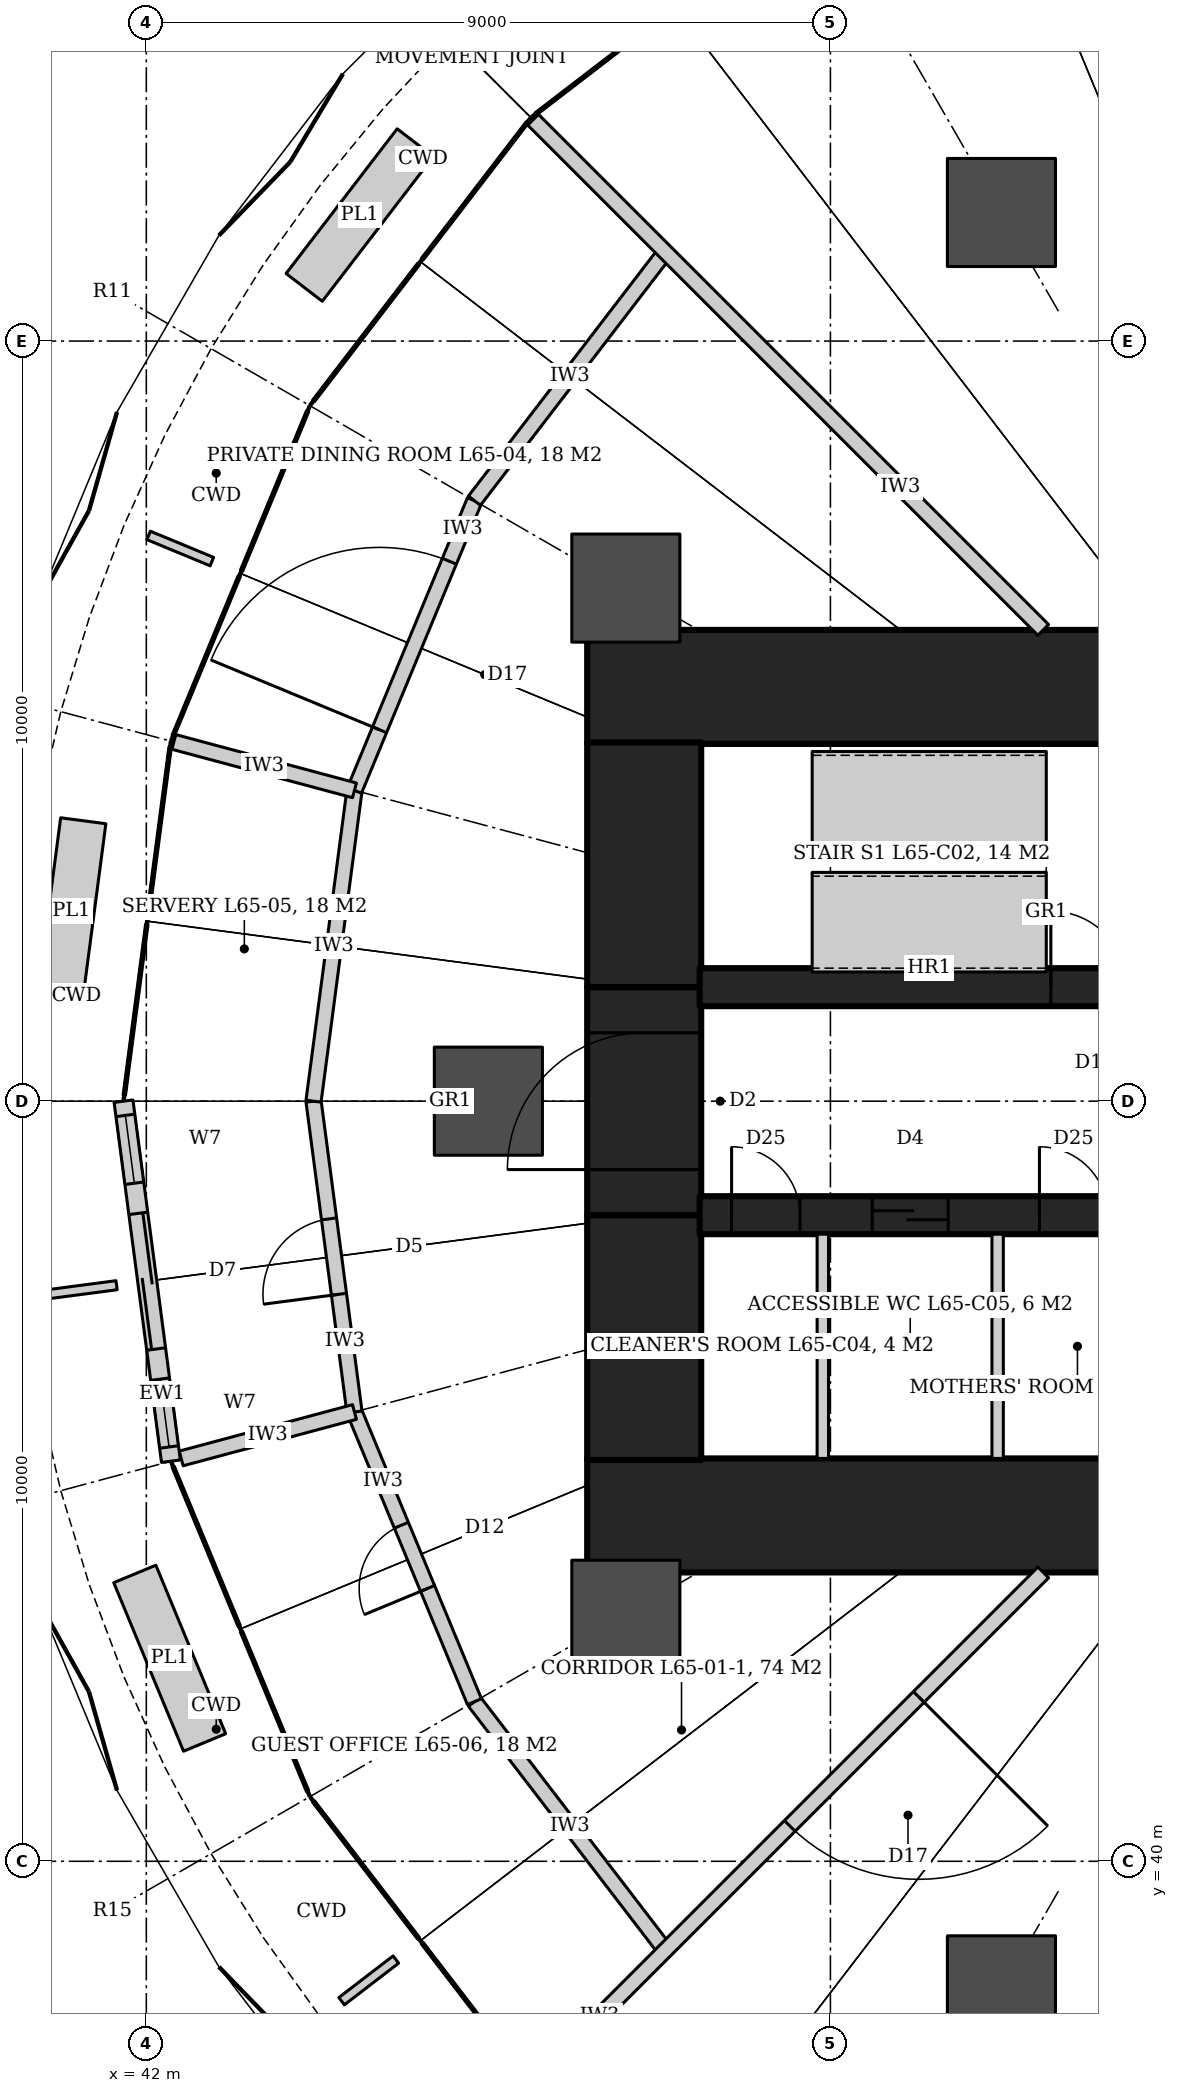
"""IFC4 building model, lengths in metres.
Left out: names, types, materials, properties, quantities, classifications, styles, units other than length and angle.
Written with IfcOpenShell. Run it as: python <this file> out.ifc"""

import sys

from ifc_helpers import new_model, si_unit, direction, frame, frame_2d, origin, origin_2d, place, context, subcontext, project, spatial, rectangle, hollow_circle, extrude, element, fill, save


model = new_model("IFC4")
c1 = context("Model", 3, precision=1e-05, world=origin(), true_north=direction((0.0, 1.0)))
c2 = subcontext(c1, "Body", "Model", "MODEL_VIEW")
j1 = project(units=[si_unit("LENGTHUNIT", "METRE"), si_unit("PLANEANGLEUNIT", "RADIAN")], contexts=[c1])
p1 = place(None, origin())
s1 = spatial("IfcSite", under=j1, at=p1, CompositionType="ELEMENT")
p2 = place(p1, origin())
s2 = spatial("IfcBuilding", under=s1, at=p2, CompositionType="ELEMENT")
p3 = place(p2, frame((0.0, 0.0, 278.0)))
s3 = spatial("IfcBuildingStorey", under=s2, at=p3, CompositionType="ELEMENT", Elevation=278.0)
for number, where, z_axis, x_axis in (
    (1, (47.8, 55.45, 0.0), (0.0, 0.0, 1.0), (1.0, 0.0, 0.0)),
    (2, (47.8, 44.55, 0.0), (0.0, 0.0, 1.0), (1.0, 0.0, 0.0)),
):
    element("IfcWall", number, at=place(p3, frame(where, z_axis=z_axis, x_axis=x_axis)), inside=s3, PredefinedType="SHEAR", context=c2, shape_type="SweptSolid", body=[
        extrude(rectangle(XDim=7.6, YDim=1.5, at=frame_2d((3.8, 0.0))), origin(), (0.0, 0.0, 1.0), 4.2),
    ])
p4 = place(p3, frame((48.55, 45.28, 0.0), z_axis=(0.0, 0.0, 1.0), x_axis=(0.0, 1.0, 0.0)))
e3 = element("IfcWall", 3, at=p4, inside=s3, PredefinedType="SHEAR", context=c2, shape_type="SweptSolid", body=[
    extrude(rectangle(XDim=3.22, YDim=1.5, at=frame_2d((1.61, 0.0))), origin(), (0.0, 0.0, 1.0), 4.2),
])
p5 = place(p3, frame((48.55, 48.5, 0.0), z_axis=(0.0, 0.0, 1.0), x_axis=(0.0, 1.0, 0.0)))
e4 = element("IfcWall", 4, at=p5, inside=s3, PredefinedType="SHEAR", context=c2, shape_type="SweptSolid", body=[
    extrude(rectangle(XDim=3.0, YDim=1.5, at=frame_2d((1.5, 0.0))), origin(), (0.0, 0.0, 1.0), 4.2),
])
p6 = place(p5, frame((0.6, 0.0, 0.0)))
e5 = element("IfcOpeningElement", 5, at=p6, cuts=e4, PredefinedType="OPENING", context=c2, shape_type="SweptSolid", body=[
    extrude(rectangle(XDim=1.8, YDim=2.1, at=frame_2d((0.9, 1.05))), frame((0.0, 0.76, 0.0), z_axis=(0.0, -1.0, 0.0), x_axis=(1.0, 0.0, 0.0)), (0.0, 0.0, 1.0), 1.52),
])
p7 = place(p3, frame((48.55, 51.5, 0.0), z_axis=(0.0, 0.0, 1.0), x_axis=(0.0, 1.0, 0.0)))
e6 = element("IfcWall", 6, at=p7, inside=s3, PredefinedType="SHEAR", context=c2, shape_type="SweptSolid", body=[
    extrude(rectangle(XDim=3.22, YDim=1.5, at=frame_2d((1.61, 0.0))), origin(), (0.0, 0.0, 1.0), 4.2),
])
p8 = place(p3, frame((49.28, 51.5, 0.0), z_axis=(0.0, 0.0, 1.0), x_axis=(1.0, 0.0, 0.0)))
e7 = element("IfcWall", 7, at=p8, inside=s3, PredefinedType="SHEAR", context=c2, shape_type="SweptSolid", body=[
    extrude(rectangle(XDim=6.12, YDim=0.5, at=frame_2d((3.06, 0.0))), origin(), (0.0, 0.0, 1.0), 4.2),
])
p9 = place(p8, frame((4.62, 0.0, 0.0)))
e8 = element("IfcOpeningElement", 8, at=p9, cuts=e7, PredefinedType="OPENING", context=c2, shape_type="SweptSolid", body=[
    extrude(rectangle(XDim=1.0, YDim=2.1, at=frame_2d((0.5, 1.05))), frame((0.0, 0.26, 0.0), z_axis=(0.0, -1.0, 0.0), x_axis=(1.0, 0.0, 0.0)), (0.0, 0.0, 1.0), 0.52),
])
p10 = place(p3, frame((49.28, 48.5, 0.0), z_axis=(0.0, 0.0, 1.0), x_axis=(1.0, 0.0, 0.0)))
e9 = element("IfcWall", 9, at=p10, inside=s3, PredefinedType="SHEAR", context=c2, shape_type="SweptSolid", body=[
    extrude(rectangle(XDim=6.12, YDim=0.5, at=frame_2d((3.06, 0.0))), origin(), (0.0, 0.0, 1.0), 4.2),
])
p11 = place(p10, frame((0.42, 0.0, 0.0)))
e10 = element("IfcOpeningElement", 10, at=p11, cuts=e9, PredefinedType="OPENING", context=c2, shape_type="SweptSolid", body=[
    extrude(rectangle(XDim=0.9, YDim=2.1, at=frame_2d((0.45, 1.05))), frame((0.0, 0.26, 0.0), z_axis=(0.0, -1.0, 0.0), x_axis=(1.0, 0.0, 0.0)), (0.0, 0.0, 1.0), 0.52),
])
p12 = place(p10, frame((2.27, 0.0, 0.0)))
e11 = element("IfcOpeningElement", 11, at=p12, cuts=e9, PredefinedType="OPENING", context=c2, shape_type="SweptSolid", body=[
    extrude(rectangle(XDim=1.0, YDim=2.1, at=frame_2d((0.5, 1.05))), frame((0.0, 0.26, 0.0), z_axis=(0.0, -1.0, 0.0), x_axis=(1.0, 0.0, 0.0)), (0.0, 0.0, 1.0), 0.52),
])
p13 = place(p10, frame((4.47, 0.0, 0.0)))
e12 = element("IfcOpeningElement", 12, at=p13, cuts=e9, PredefinedType="OPENING", context=c2, shape_type="SweptSolid", body=[
    extrude(rectangle(XDim=0.9, YDim=2.1, at=frame_2d((0.45, 1.05))), frame((0.0, 0.26, 0.0), z_axis=(0.0, -1.0, 0.0), x_axis=(1.0, 0.0, 0.0)), (0.0, 0.0, 1.0), 0.52),
])
for number, where, z_axis, x_axis in (
    (13, (53.25, 61.691, 0.0), (0.0, 0.0, 1.0), (1.0, 0.0, 0.0)),
    (14, (48.309, 56.75, 0.0), (0.0, 0.0, 1.0), (1.0, 0.0, 0.0)),
    (15, (46.5, 50.0, 0.0), (0.0, 0.0, 1.0), (1.0, 0.0, 0.0)),
    (16, (48.309, 43.25, 0.0), (0.0, 0.0, 1.0), (1.0, 0.0, 0.0)),
    (17, (53.25, 38.309, 0.0), (0.0, 0.0, 1.0), (1.0, 0.0, 0.0)),
):
    element("IfcColumn", number, at=place(p3, frame(where, z_axis=z_axis, x_axis=x_axis)), inside=s3, PredefinedType="COLUMN", context=c2, shape_type="SweptSolid", body=[
        extrude(hollow_circle(Radius=0.711, WallThickness=0.07, at=origin_2d()), origin(), (0.0, 0.0, 1.0), 4.2),
    ])
p14 = place(p3, frame((48.828, 38.828, 0.0), z_axis=(0.0, 0.0, 1.0), x_axis=(-0.608714823874, 0.793389099494, 0.0)))
e18 = element("IfcWall", 18, at=p14, inside=s3, PredefinedType="PARTITIONING", context=c2, shape_type="SweptSolid", body=[
    extrude(rectangle(XDim=4.125, YDim=0.2, at=frame_2d((2.062, 0.0))), origin(), (0.0, 0.0, 1.0), 3.02),
])
p15 = place(p3, frame((46.317, 42.1, 0.0), z_axis=(0.0, 0.0, 1.0), x_axis=(-0.382731667114, 0.923859551549, 0.0)))
e19 = element("IfcWall", 19, at=p15, inside=s3, PredefinedType="PARTITIONING", context=c2, shape_type="SweptSolid", body=[
    extrude(rectangle(XDim=4.125, YDim=0.2, at=frame_2d((2.062, 0.0))), origin(), (0.0, 0.0, 1.0), 3.02),
])
p16 = place(p15, frame((1.612, 0.0, 0.0)))
e20 = element("IfcOpeningElement", 20, at=p16, cuts=e19, PredefinedType="OPENING", context=c2, shape_type="SweptSolid", body=[
    extrude(rectangle(XDim=0.9, YDim=2.4, at=frame_2d((0.45, 1.2))), frame((0.0, 0.11, 0.0), z_axis=(0.0, -1.0, 0.0), x_axis=(1.0, 0.0, 0.0)), (0.0, 0.0, 1.0), 0.22),
])
p17 = place(p3, frame((44.738, 45.911, 0.0), z_axis=(0.0, 0.0, 1.0), x_axis=(-0.130515758099, 0.991446234996, 0.0)))
e21 = element("IfcWall", 21, at=p17, inside=s3, PredefinedType="PARTITIONING", context=c2, shape_type="SweptSolid", body=[
    extrude(rectangle(XDim=4.125, YDim=0.2, at=frame_2d((2.062, 0.0))), origin(), (0.0, 0.0, 1.0), 3.02),
])
p18 = place(p17, frame((1.562, 0.0, 0.0)))
e22 = element("IfcOpeningElement", 22, at=p18, cuts=e21, PredefinedType="OPENING", context=c2, shape_type="SweptSolid", body=[
    extrude(rectangle(XDim=1.0, YDim=2.1, at=frame_2d((0.5, 1.05))), frame((0.0, 0.11, 0.0), z_axis=(0.0, -1.0, 0.0), x_axis=(1.0, 0.0, 0.0)), (0.0, 0.0, 1.0), 0.22),
])
p19 = place(p3, frame((44.2, 50.0, 0.0), z_axis=(0.0, 0.0, 1.0), x_axis=(0.130515758099, 0.991446234996, 0.0)))
e23 = element("IfcWall", 23, at=p19, inside=s3, PredefinedType="PARTITIONING", context=c2, shape_type="SweptSolid", body=[
    extrude(rectangle(XDim=4.125, YDim=0.2, at=frame_2d((2.062, 0.0))), origin(), (0.0, 0.0, 1.0), 3.02),
])
p20 = place(p3, frame((44.738, 54.089, 0.0), z_axis=(0.0, 0.0, 1.0), x_axis=(0.382731667114, 0.923859551549, 0.0)))
e24 = element("IfcWall", 24, at=p20, inside=s3, PredefinedType="PARTITIONING", context=c2, shape_type="SweptSolid", body=[
    extrude(rectangle(XDim=4.125, YDim=0.2, at=frame_2d((2.062, 0.0))), origin(), (0.0, 0.0, 1.0), 3.02),
])
p21 = place(p20, frame((0.862, 0.0, 0.0)))
e25 = element("IfcOpeningElement", 25, at=p21, cuts=e24, PredefinedType="OPENING", context=c2, shape_type="SweptSolid", body=[
    extrude(rectangle(XDim=2.4, YDim=2.4, at=frame_2d((1.2, 1.2))), frame((0.0, 0.11, 0.0), z_axis=(0.0, -1.0, 0.0), x_axis=(1.0, 0.0, 0.0)), (0.0, 0.0, 1.0), 0.22),
])
p22 = place(p3, frame((46.317, 57.9, 0.0), z_axis=(0.0, 0.0, 1.0), x_axis=(0.608714823874, 0.793389099494, 0.0)))
e26 = element("IfcWall", 26, at=p22, inside=s3, PredefinedType="PARTITIONING", context=c2, shape_type="SweptSolid", body=[
    extrude(rectangle(XDim=4.125, YDim=0.2, at=frame_2d((2.062, 0.0))), origin(), (0.0, 0.0, 1.0), 3.02),
])
p23 = place(p3, frame((53.8, 56.2, 0.0), z_axis=(0.0, 0.0, 1.0), x_axis=(-0.707106781187, 0.707106781187, 0.0)))
e27 = element("IfcWall", 27, at=p23, inside=s3, PredefinedType="PARTITIONING", context=c2, shape_type="SweptSolid", body=[
    extrude(rectangle(XDim=9.692, YDim=0.2, at=frame_2d((4.846, 0.0))), origin(), (0.0, 0.0, 1.0), 3.02),
])
p24 = place(p3, frame((44.738, 54.089, 0.0), z_axis=(0.0, 0.0, 1.0), x_axis=(-0.965923469749, 0.25882783967, 0.0)))
e28 = element("IfcWall", 28, at=p24, inside=s3, PredefinedType="PARTITIONING", context=c2, shape_type="SweptSolid", body=[
    extrude(rectangle(XDim=2.66, YDim=0.2, at=frame_2d((1.33, 0.0))), origin(), (0.0, 0.0, 1.0), 3.02),
])
p25 = place(p3, frame((44.738, 45.911, 0.0), z_axis=(0.0, 0.0, 1.0), x_axis=(-0.965920805306, -0.258837782939, 0.0)))
e29 = element("IfcWall", 29, at=p25, inside=s3, PredefinedType="PARTITIONING", context=c2, shape_type="SweptSolid", body=[
    extrude(rectangle(XDim=2.56, YDim=0.2, at=frame_2d((1.28, 0.0))), origin(), (0.0, 0.0, 1.0), 3.02),
])
p26 = place(p3, frame((53.8, 43.8, 0.0), z_axis=(0.0, 0.0, 1.0), x_axis=(-0.707106781187, -0.707106781187, 0.0)))
e30 = element("IfcWall", 30, at=p26, inside=s3, PredefinedType="PARTITIONING", context=c2, shape_type="SweptSolid", body=[
    extrude(rectangle(XDim=9.692, YDim=0.2, at=frame_2d((4.846, 0.0))), origin(), (0.0, 0.0, 1.0), 3.02),
])
p27 = place(p26, frame((2.316, 0.0, 0.0)))
e31 = element("IfcOpeningElement", 31, at=p27, cuts=e30, PredefinedType="OPENING", context=c2, shape_type="SweptSolid", body=[
    extrude(rectangle(XDim=2.4, YDim=2.4, at=frame_2d((1.2, 1.2))), frame((0.0, 0.11, 0.0), z_axis=(0.0, -1.0, 0.0), x_axis=(1.0, 0.0, 0.0)), (0.0, 0.0, 1.0), 0.22),
])
p28 = place(p3, frame((41.5, 50.0, 0.0), z_axis=(0.0, 0.0, 1.0), x_axis=(0.130527743461, -0.991444657148, 0.0)))
e32 = element("IfcWall", 32, at=p28, inside=s3, PredefinedType="SOLIDWALL", context=c2, shape_type="SweptSolid", body=[
    extrude(rectangle(XDim=4.829, YDim=0.25, at=frame_2d((2.415, 0.0))), origin(), (0.0, 0.0, 1.0), 4.04),
])
p29 = place(p28, frame((1.515, 0.0, 0.0)))
e33 = element("IfcOpeningElement", 33, at=p29, cuts=e32, PredefinedType="OPENING", context=c2, shape_type="SweptSolid", body=[
    extrude(rectangle(XDim=1.8, YDim=2.4, at=frame_2d((0.9, 1.2))), frame((0.0, 0.135, 0.0), z_axis=(0.0, -1.0, 0.0), x_axis=(1.0, 0.0, 0.0)), (0.0, 0.0, 1.0), 0.27),
])
p30 = place(p28, frame((0.215, 0.0, 0.0)))
e34 = element("IfcOpeningElement", 34, at=p30, cuts=e32, PredefinedType="OPENING", context=c2, shape_type="SweptSolid", body=[
    extrude(rectangle(XDim=0.9, YDim=2.4, at=frame_2d((0.45, 1.2))), frame((0.0, 0.135, 0.0), z_axis=(0.0, -1.0, 0.0), x_axis=(1.0, 0.0, 0.0)), (0.0, 0.0, 1.0), 0.27),
])
p31 = place(p28, frame((3.715, 0.0, 0.0)))
e35 = element("IfcOpeningElement", 35, at=p31, cuts=e32, PredefinedType="OPENING", context=c2, shape_type="SweptSolid", body=[
    extrude(rectangle(XDim=0.9, YDim=2.4, at=frame_2d((0.45, 1.2))), frame((0.0, 0.135, 0.0), z_axis=(0.0, -1.0, 0.0), x_axis=(1.0, 0.0, 0.0)), (0.0, 0.0, 1.0), 0.27),
])
for number, where, z_axis, x_axis in (
    (36, (50.9, 45.3, 0.0), (0.0, 0.0, 1.0), (0.0, 1.0, 0.0)),
    (37, (53.2, 45.3, 0.0), (0.0, 0.0, 1.0), (0.0, 1.0, 0.0)),
):
    element("IfcWall", number, at=place(p3, frame(where, z_axis=z_axis, x_axis=x_axis)), inside=s3, PredefinedType="PARTITIONING", context=c2, shape_type="SweptSolid", body=[
        extrude(rectangle(XDim=2.95, YDim=0.15, at=frame_2d((1.475, 0.0))), origin(), (0.0, 0.0, 1.0), 4.04),
    ])
p32 = place(p21, origin())
e38 = element("IfcDoor", 38, at=p32, inside=s3, OperationType="DOUBLE_DOOR_DOUBLE_SWING", PredefinedType="DOOR", context=c2, shape_type="SweptSolid", body=[
    extrude(rectangle(XDim=2.4, YDim=2.4, at=frame_2d((1.2, 1.2))), frame((0.0, 0.025, 0.0), z_axis=(0.0, -1.0, 0.0), x_axis=(1.0, 0.0, 0.0)), (0.0, 0.0, 1.0), 0.05),
])
fill(e25, e38)
p33 = place(p18, origin())
e39 = element("IfcDoor", 39, at=p33, inside=s3, OperationType="SINGLE_SWING_LEFT", PredefinedType="DOOR", context=c2, shape_type="SweptSolid", body=[
    extrude(rectangle(XDim=1.0, YDim=2.1, at=frame_2d((0.5, 1.05))), frame((0.0, 0.025, 0.0), z_axis=(0.0, -1.0, 0.0), x_axis=(1.0, 0.0, 0.0)), (0.0, 0.0, 1.0), 0.05),
])
fill(e22, e39)
p34 = place(p16, origin())
e40 = element("IfcDoor", 40, at=p34, inside=s3, OperationType="SINGLE_SWING_LEFT", PredefinedType="DOOR", context=c2, shape_type="SweptSolid", body=[
    extrude(rectangle(XDim=0.9, YDim=2.4, at=frame_2d((0.45, 1.2))), frame((0.0, 0.025, 0.0), z_axis=(0.0, -1.0, 0.0), x_axis=(1.0, 0.0, 0.0)), (0.0, 0.0, 1.0), 0.05),
])
fill(e20, e40)
p35 = place(p27, origin())
e41 = element("IfcDoor", 41, at=p35, inside=s3, OperationType="DOUBLE_DOOR_DOUBLE_SWING", PredefinedType="DOOR", context=c2, shape_type="SweptSolid", body=[
    extrude(rectangle(XDim=2.4, YDim=2.4, at=frame_2d((1.2, 1.2))), frame((0.0, 0.025, 0.0), z_axis=(0.0, -1.0, 0.0), x_axis=(1.0, 0.0, 0.0)), (0.0, 0.0, 1.0), 0.05),
])
fill(e31, e41)
p36 = place(p29, origin())
e42 = element("IfcDoor", 42, at=p36, inside=s3, OperationType="DOUBLE_DOOR_SLIDING", PredefinedType="DOOR", context=c2, shape_type="SweptSolid", body=[
    extrude(rectangle(XDim=1.8, YDim=2.4, at=frame_2d((0.9, 1.2))), frame((0.0, 0.025, 0.0), z_axis=(0.0, -1.0, 0.0), x_axis=(1.0, 0.0, 0.0)), (0.0, 0.0, 1.0), 0.05),
])
fill(e33, e42)
p37 = place(p30, origin())
e43 = element("IfcWindow", 43, at=p37, inside=s3, PartitioningType="SINGLE_PANEL", PredefinedType="WINDOW", context=c2, shape_type="SweptSolid", body=[
    extrude(rectangle(XDim=0.9, YDim=2.4, at=frame_2d((0.45, 1.2))), frame((0.0, 0.03, 0.0), z_axis=(0.0, -1.0, 0.0), x_axis=(1.0, 0.0, 0.0)), (0.0, 0.0, 1.0), 0.06),
])
fill(e34, e43)
p38 = place(p31, origin())
e44 = element("IfcWindow", 44, at=p38, inside=s3, PartitioningType="SINGLE_PANEL", PredefinedType="WINDOW", context=c2, shape_type="SweptSolid", body=[
    extrude(rectangle(XDim=0.9, YDim=2.4, at=frame_2d((0.45, 1.2))), frame((0.0, 0.03, 0.0), z_axis=(0.0, -1.0, 0.0), x_axis=(1.0, 0.0, 0.0)), (0.0, 0.0, 1.0), 0.06),
])
fill(e35, e44)
p39 = place(p9, origin())
e45 = element("IfcDoor", 45, at=p39, inside=s3, OperationType="SINGLE_SWING_LEFT", PredefinedType="DOOR", context=c2, shape_type="SweptSolid", body=[
    extrude(rectangle(XDim=1.0, YDim=2.1, at=frame_2d((0.5, 1.05))), frame((0.0, 0.025, 0.0), z_axis=(0.0, -1.0, 0.0), x_axis=(1.0, 0.0, 0.0)), (0.0, 0.0, 1.0), 0.05),
])
fill(e8, e45)
p40 = place(p11, origin())
e46 = element("IfcDoor", 46, at=p40, inside=s3, OperationType="SINGLE_SWING_RIGHT", PredefinedType="DOOR", context=c2, shape_type="SweptSolid", body=[
    extrude(rectangle(XDim=0.9, YDim=2.1, at=frame_2d((0.45, 1.05))), frame((0.0, 0.025, 0.0), z_axis=(0.0, -1.0, 0.0), x_axis=(1.0, 0.0, 0.0)), (0.0, 0.0, 1.0), 0.05),
])
fill(e10, e46)
p41 = place(p12, origin())
e47 = element("IfcDoor", 47, at=p41, inside=s3, OperationType="SLIDING_TO_LEFT", PredefinedType="DOOR", context=c2, shape_type="SweptSolid", body=[
    extrude(rectangle(XDim=1.0, YDim=2.1, at=frame_2d((0.5, 1.05))), frame((0.0, 0.025, 0.0), z_axis=(0.0, -1.0, 0.0), x_axis=(1.0, 0.0, 0.0)), (0.0, 0.0, 1.0), 0.05),
])
fill(e11, e47)
p42 = place(p13, origin())
e48 = element("IfcDoor", 48, at=p42, inside=s3, OperationType="SINGLE_SWING_RIGHT", PredefinedType="DOOR", context=c2, shape_type="SweptSolid", body=[
    extrude(rectangle(XDim=0.9, YDim=2.1, at=frame_2d((0.45, 1.05))), frame((0.0, 0.025, 0.0), z_axis=(0.0, -1.0, 0.0), x_axis=(1.0, 0.0, 0.0)), (0.0, 0.0, 1.0), 0.05),
])
fill(e12, e48)
p43 = place(p6, origin())
e49 = element("IfcDoor", 49, at=p43, inside=s3, OperationType="DOUBLE_DOOR_DOUBLE_SWING", PredefinedType="DOOR", context=c2, shape_type="SweptSolid", body=[
    extrude(rectangle(XDim=1.8, YDim=2.1, at=frame_2d((0.9, 1.05))), frame((0.0, 0.025, 0.0), z_axis=(0.0, -1.0, 0.0), x_axis=(1.0, 0.0, 0.0)), (0.0, 0.0, 1.0), 0.05),
])
fill(e5, e49)
save(model, sys.argv[1])
